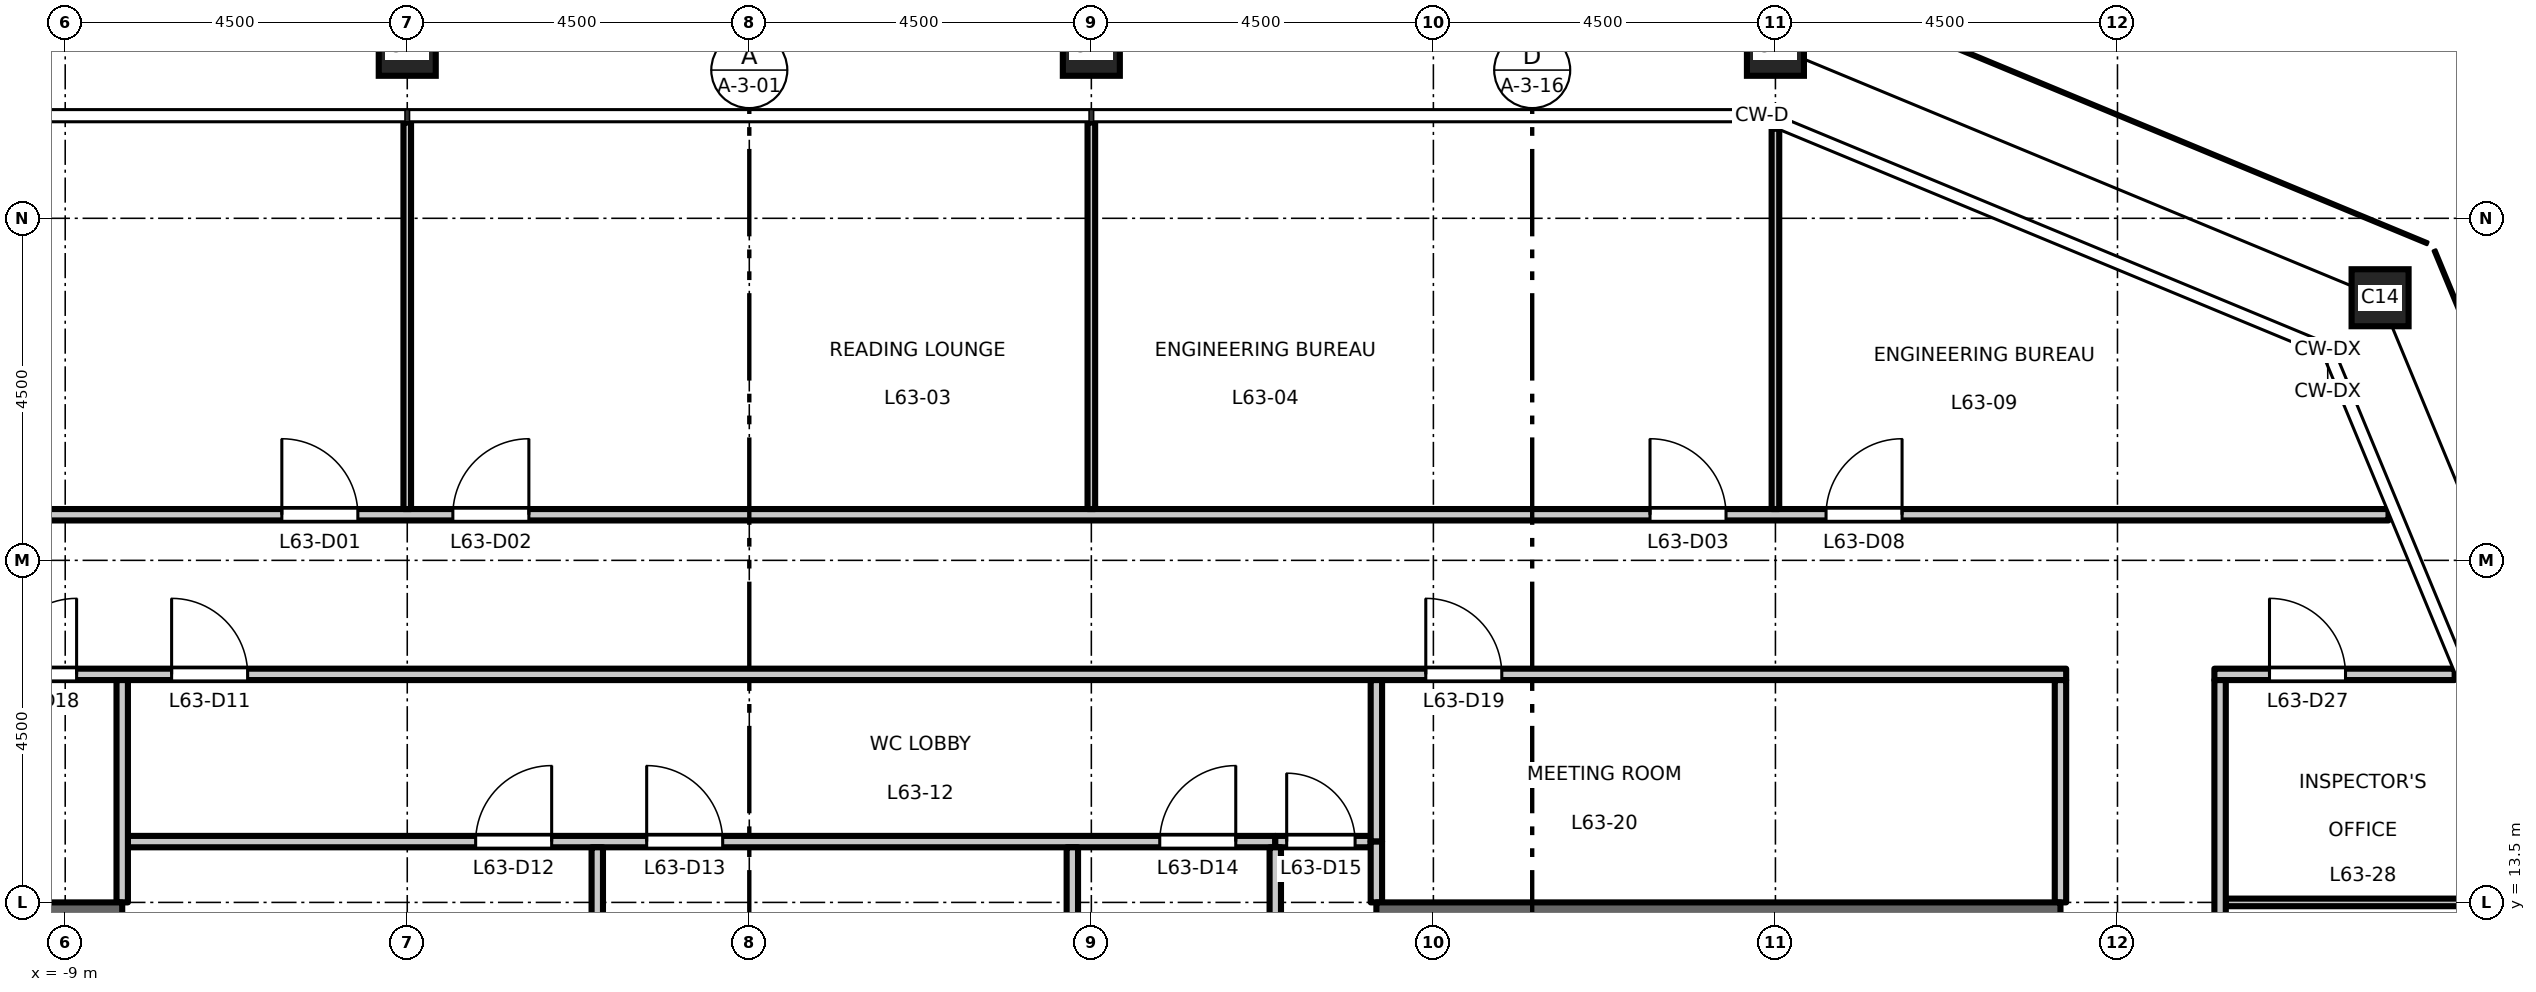
"""IFC4 building model, lengths in metres.
Left out: names, types, materials, properties, quantities, classifications, styles, units other than length and angle.
Written with IfcOpenShell. Run it as: python <this file> out.ifc"""

import sys

from ifc_helpers import new_model, si_unit, direction, frame, frame_2d, origin, origin_2d, place, context, subcontext, project, spatial, rectangle, hollow_rectangle, extrude, element, fill, save


model = new_model("IFC4")
c1 = context("Model", 3, precision=1e-05, world=origin(), true_north=direction((0.0, 1.0)))
c2 = subcontext(c1, "Body", "Model", "MODEL_VIEW")
j1 = project(units=[si_unit("LENGTHUNIT", "METRE"), si_unit("PLANEANGLEUNIT", "RADIAN")], contexts=[c1])
p1 = place(None, origin())
s1 = spatial("IfcSite", under=j1, at=p1, CompositionType="ELEMENT")
p2 = place(p1, origin())
s2 = spatial("IfcBuilding", under=s1, at=p2, CompositionType="ELEMENT")
p3 = place(p2, frame((0.0, 0.0, 294.2)))
s3 = spatial("IfcBuildingStorey", under=s2, at=p3, CompositionType="ELEMENT", Elevation=294.2)
for number, where, z_axis, x_axis in (
    (1, (21.455, 21.455, 0.0), (0.0, 0.0, 1.0), (1.0, 0.0, 0.0)),
    (2, (13.5, 24.75, 0.0), (0.0, 0.0, 1.0), (1.0, 0.0, 0.0)),
    (3, (4.5, 24.75, 0.0), (0.0, 0.0, 1.0), (1.0, 0.0, 0.0)),
    (4, (-4.5, 24.75, 0.0), (0.0, 0.0, 1.0), (1.0, 0.0, 0.0)),
):
    element("IfcColumn", number, at=place(p3, frame(where, z_axis=z_axis, x_axis=x_axis)), inside=s3, PredefinedType="COLUMN", context=c2, shape_type="SweptSolid", body=[
        extrude(hollow_rectangle(XDim=0.75, YDim=0.75, WallThickness=0.04, at=origin_2d()), origin(), (0.0, 0.0, 1.0), 4.5),
    ])
for number, where, z_axis, x_axis in (
    (5, (-8.25, 13.25, 0.0), (0.0, 0.0, 1.0), (-1.0, 0.0, 0.0)),
    (6, (8.25, 13.25, 0.0), (0.0, 0.0, 1.0), (1.0, 0.0, 0.0)),
):
    element("IfcWall", number, at=place(p3, frame(where, z_axis=z_axis, x_axis=x_axis)), inside=s3, PredefinedType="SHEAR", context=c2, shape_type="SweptSolid", body=[
        extrude(rectangle(XDim=9.0, YDim=0.5, at=frame_2d((4.5, 0.0))), origin(), (0.0, 0.0, 1.0), 4.35),
    ])
p4 = place(p3, frame((19.425, 13.5, 0.0), z_axis=(0.0, 0.0, 1.0), x_axis=(1.0, 0.0, 0.0)))
e7 = element("IfcWall", 7, at=p4, inside=s3, PredefinedType="PARTITIONING", context=c2, shape_type="SweptSolid", body=[
    extrude(rectangle(XDim=4.253, YDim=0.1, at=frame_2d((2.126, 0.0))), origin(), (0.0, 0.0, 1.0), 4.35),
])
p5 = place(p3, frame((-8.175, 14.3, 0.0), z_axis=(0.0, 0.0, 1.0), x_axis=(1.0, 0.0, 0.0)))
e8 = element("IfcWall", 8, at=p5, inside=s3, PredefinedType="PARTITIONING", context=c2, shape_type="SweptSolid", body=[
    extrude(rectangle(XDim=15.095, YDim=0.15, at=frame_2d((7.547, 0.0))), origin(), (0.0, 0.0, 1.0), 4.35),
])
p6 = place(p5, frame((4.575, 0.0, 0.0)))
e9 = element("IfcOpeningElement", 9, at=p6, cuts=e8, PredefinedType="OPENING", context=c2, shape_type="SweptSolid", body=[
    extrude(rectangle(XDim=1.0, YDim=2.1, at=frame_2d((0.5, 1.05))), frame((0.0, 0.085, 0.0), z_axis=(0.0, -1.0, 0.0), x_axis=(1.0, 0.0, 0.0)), (0.0, 0.0, 1.0), 0.17),
])
p7 = place(p5, frame((6.825, 0.0, 0.0)))
e10 = element("IfcOpeningElement", 10, at=p7, cuts=e8, PredefinedType="OPENING", context=c2, shape_type="SweptSolid", body=[
    extrude(rectangle(XDim=1.0, YDim=2.1, at=frame_2d((0.5, 1.05))), frame((0.0, 0.085, 0.0), z_axis=(0.0, -1.0, 0.0), x_axis=(1.0, 0.0, 0.0)), (0.0, 0.0, 1.0), 0.17),
])
p8 = place(p5, frame((13.575, 0.0, 0.0)))
e11 = element("IfcOpeningElement", 11, at=p8, cuts=e8, PredefinedType="OPENING", context=c2, shape_type="SweptSolid", body=[
    extrude(rectangle(XDim=1.0, YDim=2.1, at=frame_2d((0.5, 1.05))), frame((0.0, 0.085, 0.0), z_axis=(0.0, -1.0, 0.0), x_axis=(1.0, 0.0, 0.0)), (0.0, 0.0, 1.0), 0.17),
])
p9 = place(p3, frame((6.92, 14.3, 0.0), z_axis=(0.0, 0.0, 1.0), x_axis=(1.0, 0.0, 0.0)))
e12 = element("IfcWall", 12, at=p9, inside=s3, PredefinedType="PARTITIONING", context=c2, shape_type="SweptSolid", body=[
    extrude(rectangle(XDim=1.255, YDim=0.15, at=frame_2d((0.627, 0.0))), origin(), (0.0, 0.0, 1.0), 4.35),
])
p10 = place(p9, frame((0.15, 0.0, 0.0)))
e13 = element("IfcOpeningElement", 13, at=p10, cuts=e12, PredefinedType="OPENING", context=c2, shape_type="SweptSolid", body=[
    extrude(rectangle(XDim=0.9, YDim=2.1, at=frame_2d((0.45, 1.05))), frame((0.0, 0.085, 0.0), z_axis=(0.0, -1.0, 0.0), x_axis=(1.0, 0.0, 0.0)), (0.0, 0.0, 1.0), 0.17),
])
p11 = place(p3, frame((-17.325, 16.5, 0.0), z_axis=(0.0, 0.0, 1.0), x_axis=(1.0, 0.0, 0.0)))
e14 = element("IfcWall", 14, at=p11, inside=s3, PredefinedType="PARTITIONING", context=c2, shape_type="SweptSolid", body=[
    extrude(rectangle(XDim=34.65, YDim=0.15, at=frame_2d((17.325, 0.0))), origin(), (0.0, 0.0, 1.0), 4.35),
])
p12 = place(p11, frame((9.725, 0.0, 0.0)))
e15 = element("IfcOpeningElement", 15, at=p12, cuts=e14, PredefinedType="OPENING", context=c2, shape_type="SweptSolid", body=[
    extrude(rectangle(XDim=1.0, YDim=2.1, at=frame_2d((0.5, 1.05))), frame((0.0, 0.085, 0.0), z_axis=(0.0, -1.0, 0.0), x_axis=(1.0, 0.0, 0.0)), (0.0, 0.0, 1.0), 0.17),
])
p13 = place(p11, frame((7.475, 0.0, 0.0)))
e16 = element("IfcOpeningElement", 16, at=p13, cuts=e14, PredefinedType="OPENING", context=c2, shape_type="SweptSolid", body=[
    extrude(rectangle(XDim=1.0, YDim=2.1, at=frame_2d((0.5, 1.05))), frame((0.0, 0.085, 0.0), z_axis=(0.0, -1.0, 0.0), x_axis=(1.0, 0.0, 0.0)), (0.0, 0.0, 1.0), 0.17),
])
p14 = place(p11, frame((26.225, 0.0, 0.0)))
e17 = element("IfcOpeningElement", 17, at=p14, cuts=e14, PredefinedType="OPENING", context=c2, shape_type="SweptSolid", body=[
    extrude(rectangle(XDim=1.0, YDim=2.1, at=frame_2d((0.5, 1.05))), frame((0.0, 0.085, 0.0), z_axis=(0.0, -1.0, 0.0), x_axis=(1.0, 0.0, 0.0)), (0.0, 0.0, 1.0), 0.17),
])
p15 = place(p3, frame((19.275, 16.5, 0.0), z_axis=(0.0, 0.0, 1.0), x_axis=(1.0, 0.0, 0.0)))
e18 = element("IfcWall", 18, at=p15, inside=s3, PredefinedType="PARTITIONING", context=c2, shape_type="SweptSolid", body=[
    extrude(rectangle(XDim=3.161, YDim=0.15, at=frame_2d((1.581, 0.0))), origin(), (0.0, 0.0, 1.0), 4.35),
])
p16 = place(p15, frame((0.725, 0.0, 0.0)))
e19 = element("IfcOpeningElement", 19, at=p16, cuts=e18, PredefinedType="OPENING", context=c2, shape_type="SweptSolid", body=[
    extrude(rectangle(XDim=1.0, YDim=2.1, at=frame_2d((0.5, 1.05))), frame((0.0, 0.085, 0.0), z_axis=(0.0, -1.0, 0.0), x_axis=(1.0, 0.0, 0.0)), (0.0, 0.0, 1.0), 0.17),
])
p17 = place(p3, frame((-21.566, 18.6, 0.0), z_axis=(0.0, 0.0, 1.0), x_axis=(1.0, 0.0, 0.0)))
e20 = element("IfcWall", 20, at=p17, inside=s3, PredefinedType="PARTITIONING", context=c2, shape_type="SweptSolid", body=[
    extrude(rectangle(XDim=43.132, YDim=0.15, at=frame_2d((21.566, 0.0))), origin(), (0.0, 0.0, 1.0), 4.35),
])
p18 = place(p17, frame((15.416, 0.0, 0.0)))
e21 = element("IfcOpeningElement", 21, at=p18, cuts=e20, PredefinedType="OPENING", context=c2, shape_type="SweptSolid", body=[
    extrude(rectangle(XDim=1.0, YDim=2.1, at=frame_2d((0.5, 1.05))), frame((0.0, 0.085, 0.0), z_axis=(0.0, -1.0, 0.0), x_axis=(1.0, 0.0, 0.0)), (0.0, 0.0, 1.0), 0.17),
])
p19 = place(p17, frame((17.666, 0.0, 0.0)))
e22 = element("IfcOpeningElement", 22, at=p19, cuts=e20, PredefinedType="OPENING", context=c2, shape_type="SweptSolid", body=[
    extrude(rectangle(XDim=1.0, YDim=2.1, at=frame_2d((0.5, 1.05))), frame((0.0, 0.085, 0.0), z_axis=(0.0, -1.0, 0.0), x_axis=(1.0, 0.0, 0.0)), (0.0, 0.0, 1.0), 0.17),
])
p20 = place(p17, frame((33.416, 0.0, 0.0)))
e23 = element("IfcOpeningElement", 23, at=p20, cuts=e20, PredefinedType="OPENING", context=c2, shape_type="SweptSolid", body=[
    extrude(rectangle(XDim=1.0, YDim=2.1, at=frame_2d((0.5, 1.05))), frame((0.0, 0.085, 0.0), z_axis=(0.0, -1.0, 0.0), x_axis=(1.0, 0.0, 0.0)), (0.0, 0.0, 1.0), 0.17),
])
p21 = place(p17, frame((6.416, 0.0, 0.0)))
e24 = element("IfcOpeningElement", 24, at=p21, cuts=e20, PredefinedType="OPENING", context=c2, shape_type="SweptSolid", body=[
    extrude(rectangle(XDim=1.0, YDim=2.1, at=frame_2d((0.5, 1.05))), frame((0.0, 0.085, 0.0), z_axis=(0.0, -1.0, 0.0), x_axis=(1.0, 0.0, 0.0)), (0.0, 0.0, 1.0), 0.17),
])
p22 = place(p17, frame((35.732, 0.0, 0.0)))
e25 = element("IfcOpeningElement", 25, at=p22, cuts=e20, PredefinedType="OPENING", context=c2, shape_type="SweptSolid", body=[
    extrude(rectangle(XDim=1.0, YDim=2.1, at=frame_2d((0.5, 1.05))), frame((0.0, 0.085, 0.0), z_axis=(0.0, -1.0, 0.0), x_axis=(1.0, 0.0, 0.0)), (0.0, 0.0, 1.0), 0.17),
])
p23 = place(p3, frame((-8.25, 13.5, 0.0), z_axis=(0.0, 0.0, 1.0), x_axis=(0.0, 1.0, 0.0)))
e26 = element("IfcWall", 26, at=p23, inside=s3, PredefinedType="PARTITIONING", context=c2, shape_type="SweptSolid", body=[
    extrude(rectangle(XDim=2.925, YDim=0.15, at=frame_2d((1.462, 0.0))), origin(), (0.0, 0.0, 1.0), 4.35),
])
p24 = place(p3, frame((-4.5, 18.675, 0.0), z_axis=(0.0, 0.0, 1.0), x_axis=(0.0, 1.0, 0.0)))
e27 = element("IfcWall", 27, at=p24, inside=s3, PredefinedType="PARTITIONING", context=c2, shape_type="SweptSolid", body=[
    extrude(rectangle(XDim=5.085, YDim=0.1, at=frame_2d((2.542, 0.0))), origin(), (0.0, 0.0, 1.0), 3.65),
])
for number, where, z_axis, x_axis in (
    (28, (-2.0, 8.37, 0.0), (0.0, 0.0, 1.0), (0.0, 1.0, 0.0)),
    (29, (4.25, 8.37, 0.0), (0.0, 0.0, 1.0), (0.0, 1.0, 0.0)),
):
    element("IfcWall", number, at=place(p3, frame(where, z_axis=z_axis, x_axis=x_axis)), inside=s3, PredefinedType="PARTITIONING", context=c2, shape_type="SweptSolid", body=[
        extrude(rectangle(XDim=5.855, YDim=0.15, at=frame_2d((2.927, 0.0))), origin(), (0.0, 0.0, 1.0), 4.35),
    ])
p25 = place(p3, frame((4.5, 18.675, 0.0), z_axis=(0.0, 0.0, 1.0), x_axis=(0.0, 1.0, 0.0)))
e30 = element("IfcWall", 30, at=p25, inside=s3, PredefinedType="PARTITIONING", context=c2, shape_type="SweptSolid", body=[
    extrude(rectangle(XDim=5.085, YDim=0.1, at=frame_2d((2.542, 0.0))), origin(), (0.0, 0.0, 1.0), 3.65),
])
p26 = place(p3, frame((6.92, 8.029, 0.0), z_axis=(0.0, 0.0, 1.0), x_axis=(0.0, 1.0, 0.0)))
e31 = element("IfcWall", 31, at=p26, inside=s3, PredefinedType="PARTITIONING", context=c2, shape_type="SweptSolid", body=[
    extrude(rectangle(XDim=6.196, YDim=0.15, at=frame_2d((3.098, 0.0))), origin(), (0.0, 0.0, 1.0), 4.35),
])
p27 = place(p3, frame((8.25, 14.3, 0.0), z_axis=(0.0, 0.0, 1.0), x_axis=(0.0, 1.0, 0.0)))
e32 = element("IfcWall", 32, at=p27, inside=s3, PredefinedType="PARTITIONING", context=c2, shape_type="SweptSolid", body=[
    extrude(rectangle(XDim=2.125, YDim=0.15, at=frame_2d((1.062, 0.0))), origin(), (0.0, 0.0, 1.0), 4.35),
])
p28 = place(p3, frame((8.25, 13.5, 0.0), z_axis=(0.0, 0.0, 1.0), x_axis=(0.0, 1.0, 0.0)))
e33 = element("IfcWall", 33, at=p28, inside=s3, PredefinedType="PARTITIONING", context=c2, shape_type="SweptSolid", body=[
    extrude(rectangle(XDim=0.8, YDim=0.15, at=frame_2d((0.4, 0.0))), origin(), (0.0, 0.0, 1.0), 4.35),
])
p29 = place(p3, frame((13.5, 18.675, 0.0), z_axis=(0.0, 0.0, 1.0), x_axis=(0.0, 1.0, 0.0)))
e34 = element("IfcWall", 34, at=p29, inside=s3, PredefinedType="PARTITIONING", context=c2, shape_type="SweptSolid", body=[
    extrude(rectangle(XDim=5.003, YDim=0.1, at=frame_2d((2.501, 0.0))), origin(), (0.0, 0.0, 1.0), 3.75),
])
p30 = place(p3, frame((17.25, 13.5, 0.0), z_axis=(0.0, 0.0, 1.0), x_axis=(0.0, 1.0, 0.0)))
e35 = element("IfcWall", 35, at=p30, inside=s3, PredefinedType="PARTITIONING", context=c2, shape_type="SweptSolid", body=[
    extrude(rectangle(XDim=2.925, YDim=0.15, at=frame_2d((1.462, 0.0))), origin(), (0.0, 0.0, 1.0), 4.35),
])
p31 = place(p3, frame((19.35, -16.425, 0.0), z_axis=(0.0, 0.0, 1.0), x_axis=(0.0, 1.0, 0.0)))
e36 = element("IfcWall", 36, at=p31, inside=s3, PredefinedType="PARTITIONING", context=c2, shape_type="SweptSolid", body=[
    extrude(rectangle(XDim=32.85, YDim=0.15, at=frame_2d((16.425, 0.0))), origin(), (0.0, 0.0, 1.0), 4.35),
])
p32 = place(p31, frame((10.325, 0.0, 0.0)))
e37 = element("IfcOpeningElement", 37, at=p32, cuts=e36, PredefinedType="OPENING", context=c2, shape_type="SweptSolid", body=[
    extrude(rectangle(XDim=1.0, YDim=2.1, at=frame_2d((0.5, 1.05))), frame((0.0, 0.085, 0.0), z_axis=(0.0, -1.0, 0.0), x_axis=(1.0, 0.0, 0.0)), (0.0, 0.0, 1.0), 0.17),
])
p33 = place(p31, frame((12.575, 0.0, 0.0)))
e38 = element("IfcOpeningElement", 38, at=p33, cuts=e36, PredefinedType="OPENING", context=c2, shape_type="SweptSolid", body=[
    extrude(rectangle(XDim=1.0, YDim=2.1, at=frame_2d((0.5, 1.05))), frame((0.0, 0.085, 0.0), z_axis=(0.0, -1.0, 0.0), x_axis=(1.0, 0.0, 0.0)), (0.0, 0.0, 1.0), 0.17),
])
p34 = place(p31, frame((28.325, 0.0, 0.0)))
e39 = element("IfcOpeningElement", 39, at=p34, cuts=e36, PredefinedType="OPENING", context=c2, shape_type="SweptSolid", body=[
    extrude(rectangle(XDim=1.0, YDim=2.1, at=frame_2d((0.5, 1.05))), frame((0.0, 0.085, 0.0), z_axis=(0.0, -1.0, 0.0), x_axis=(1.0, 0.0, 0.0)), (0.0, 0.0, 1.0), 0.17),
])
p35 = place(p18, origin())
e40 = element("IfcDoor", 40, at=p35, inside=s3, OperationType="SINGLE_SWING_LEFT", PredefinedType="DOOR", context=c2, shape_type="SweptSolid", body=[
    extrude(rectangle(XDim=1.0, YDim=2.1, at=frame_2d((0.5, 1.05))), frame((0.0, 0.025, 0.0), z_axis=(0.0, -1.0, 0.0), x_axis=(1.0, 0.0, 0.0)), (0.0, 0.0, 1.0), 0.05),
])
fill(e21, e40)
p36 = place(p19, origin())
e41 = element("IfcDoor", 41, at=p36, inside=s3, OperationType="SINGLE_SWING_RIGHT", PredefinedType="DOOR", context=c2, shape_type="SweptSolid", body=[
    extrude(rectangle(XDim=1.0, YDim=2.1, at=frame_2d((0.5, 1.05))), frame((0.0, 0.025, 0.0), z_axis=(0.0, -1.0, 0.0), x_axis=(1.0, 0.0, 0.0)), (0.0, 0.0, 1.0), 0.05),
])
fill(e22, e41)
p37 = place(p20, origin())
e42 = element("IfcDoor", 42, at=p37, inside=s3, OperationType="SINGLE_SWING_LEFT", PredefinedType="DOOR", context=c2, shape_type="SweptSolid", body=[
    extrude(rectangle(XDim=1.0, YDim=2.1, at=frame_2d((0.5, 1.05))), frame((0.0, 0.025, 0.0), z_axis=(0.0, -1.0, 0.0), x_axis=(1.0, 0.0, 0.0)), (0.0, 0.0, 1.0), 0.05),
])
fill(e23, e42)
p38 = place(p22, origin())
e43 = element("IfcDoor", 43, at=p38, inside=s3, OperationType="SINGLE_SWING_RIGHT", PredefinedType="DOOR", context=c2, shape_type="SweptSolid", body=[
    extrude(rectangle(XDim=1.0, YDim=2.1, at=frame_2d((0.5, 1.05))), frame((0.0, 0.025, 0.0), z_axis=(0.0, -1.0, 0.0), x_axis=(1.0, 0.0, 0.0)), (0.0, 0.0, 1.0), 0.05),
])
fill(e25, e43)
p39 = place(p12, origin())
e44 = element("IfcDoor", 44, at=p39, inside=s3, OperationType="SINGLE_SWING_LEFT", PredefinedType="DOOR", context=c2, shape_type="SweptSolid", body=[
    extrude(rectangle(XDim=1.0, YDim=2.1, at=frame_2d((0.5, 1.05))), frame((0.0, 0.025, 0.0), z_axis=(0.0, -1.0, 0.0), x_axis=(1.0, 0.0, 0.0)), (0.0, 0.0, 1.0), 0.05),
])
fill(e15, e44)
p40 = place(p6, origin())
e45 = element("IfcDoor", 45, at=p40, inside=s3, OperationType="SINGLE_SWING_RIGHT", PredefinedType="DOOR", context=c2, shape_type="SweptSolid", body=[
    extrude(rectangle(XDim=1.0, YDim=2.1, at=frame_2d((0.5, 1.05))), frame((0.0, 0.025, 0.0), z_axis=(0.0, -1.0, 0.0), x_axis=(1.0, 0.0, 0.0)), (0.0, 0.0, 1.0), 0.05),
])
fill(e9, e45)
p41 = place(p7, origin())
e46 = element("IfcDoor", 46, at=p41, inside=s3, OperationType="SINGLE_SWING_LEFT", PredefinedType="DOOR", context=c2, shape_type="SweptSolid", body=[
    extrude(rectangle(XDim=1.0, YDim=2.1, at=frame_2d((0.5, 1.05))), frame((0.0, 0.025, 0.0), z_axis=(0.0, -1.0, 0.0), x_axis=(1.0, 0.0, 0.0)), (0.0, 0.0, 1.0), 0.05),
])
fill(e10, e46)
p42 = place(p8, origin())
e47 = element("IfcDoor", 47, at=p42, inside=s3, OperationType="SINGLE_SWING_RIGHT", PredefinedType="DOOR", context=c2, shape_type="SweptSolid", body=[
    extrude(rectangle(XDim=1.0, YDim=2.1, at=frame_2d((0.5, 1.05))), frame((0.0, 0.025, 0.0), z_axis=(0.0, -1.0, 0.0), x_axis=(1.0, 0.0, 0.0)), (0.0, 0.0, 1.0), 0.05),
])
fill(e11, e47)
p43 = place(p10, origin())
e48 = element("IfcDoor", 48, at=p43, inside=s3, OperationType="SINGLE_SWING_LEFT", PredefinedType="DOOR", context=c2, shape_type="SweptSolid", body=[
    extrude(rectangle(XDim=0.9, YDim=2.1, at=frame_2d((0.45, 1.05))), frame((0.0, 0.025, 0.0), z_axis=(0.0, -1.0, 0.0), x_axis=(1.0, 0.0, 0.0)), (0.0, 0.0, 1.0), 0.05),
])
fill(e13, e48)
p44 = place(p13, origin())
e49 = element("IfcDoor", 49, at=p44, inside=s3, OperationType="SINGLE_SWING_RIGHT", PredefinedType="DOOR", context=c2, shape_type="SweptSolid", body=[
    extrude(rectangle(XDim=1.0, YDim=2.1, at=frame_2d((0.5, 1.05))), frame((0.0, 0.025, 0.0), z_axis=(0.0, -1.0, 0.0), x_axis=(1.0, 0.0, 0.0)), (0.0, 0.0, 1.0), 0.05),
])
fill(e16, e49)
p45 = place(p14, origin())
e50 = element("IfcDoor", 50, at=p45, inside=s3, OperationType="SINGLE_SWING_LEFT", PredefinedType="DOOR", context=c2, shape_type="SweptSolid", body=[
    extrude(rectangle(XDim=1.0, YDim=2.1, at=frame_2d((0.5, 1.05))), frame((0.0, 0.025, 0.0), z_axis=(0.0, -1.0, 0.0), x_axis=(1.0, 0.0, 0.0)), (0.0, 0.0, 1.0), 0.05),
])
fill(e17, e50)
p46 = place(p16, origin())
e51 = element("IfcDoor", 51, at=p46, inside=s3, OperationType="SINGLE_SWING_LEFT", PredefinedType="DOOR", context=c2, shape_type="SweptSolid", body=[
    extrude(rectangle(XDim=1.0, YDim=2.1, at=frame_2d((0.5, 1.05))), frame((0.0, 0.025, 0.0), z_axis=(0.0, -1.0, 0.0), x_axis=(1.0, 0.0, 0.0)), (0.0, 0.0, 1.0), 0.05),
])
fill(e19, e51)
save(model, sys.argv[1])
